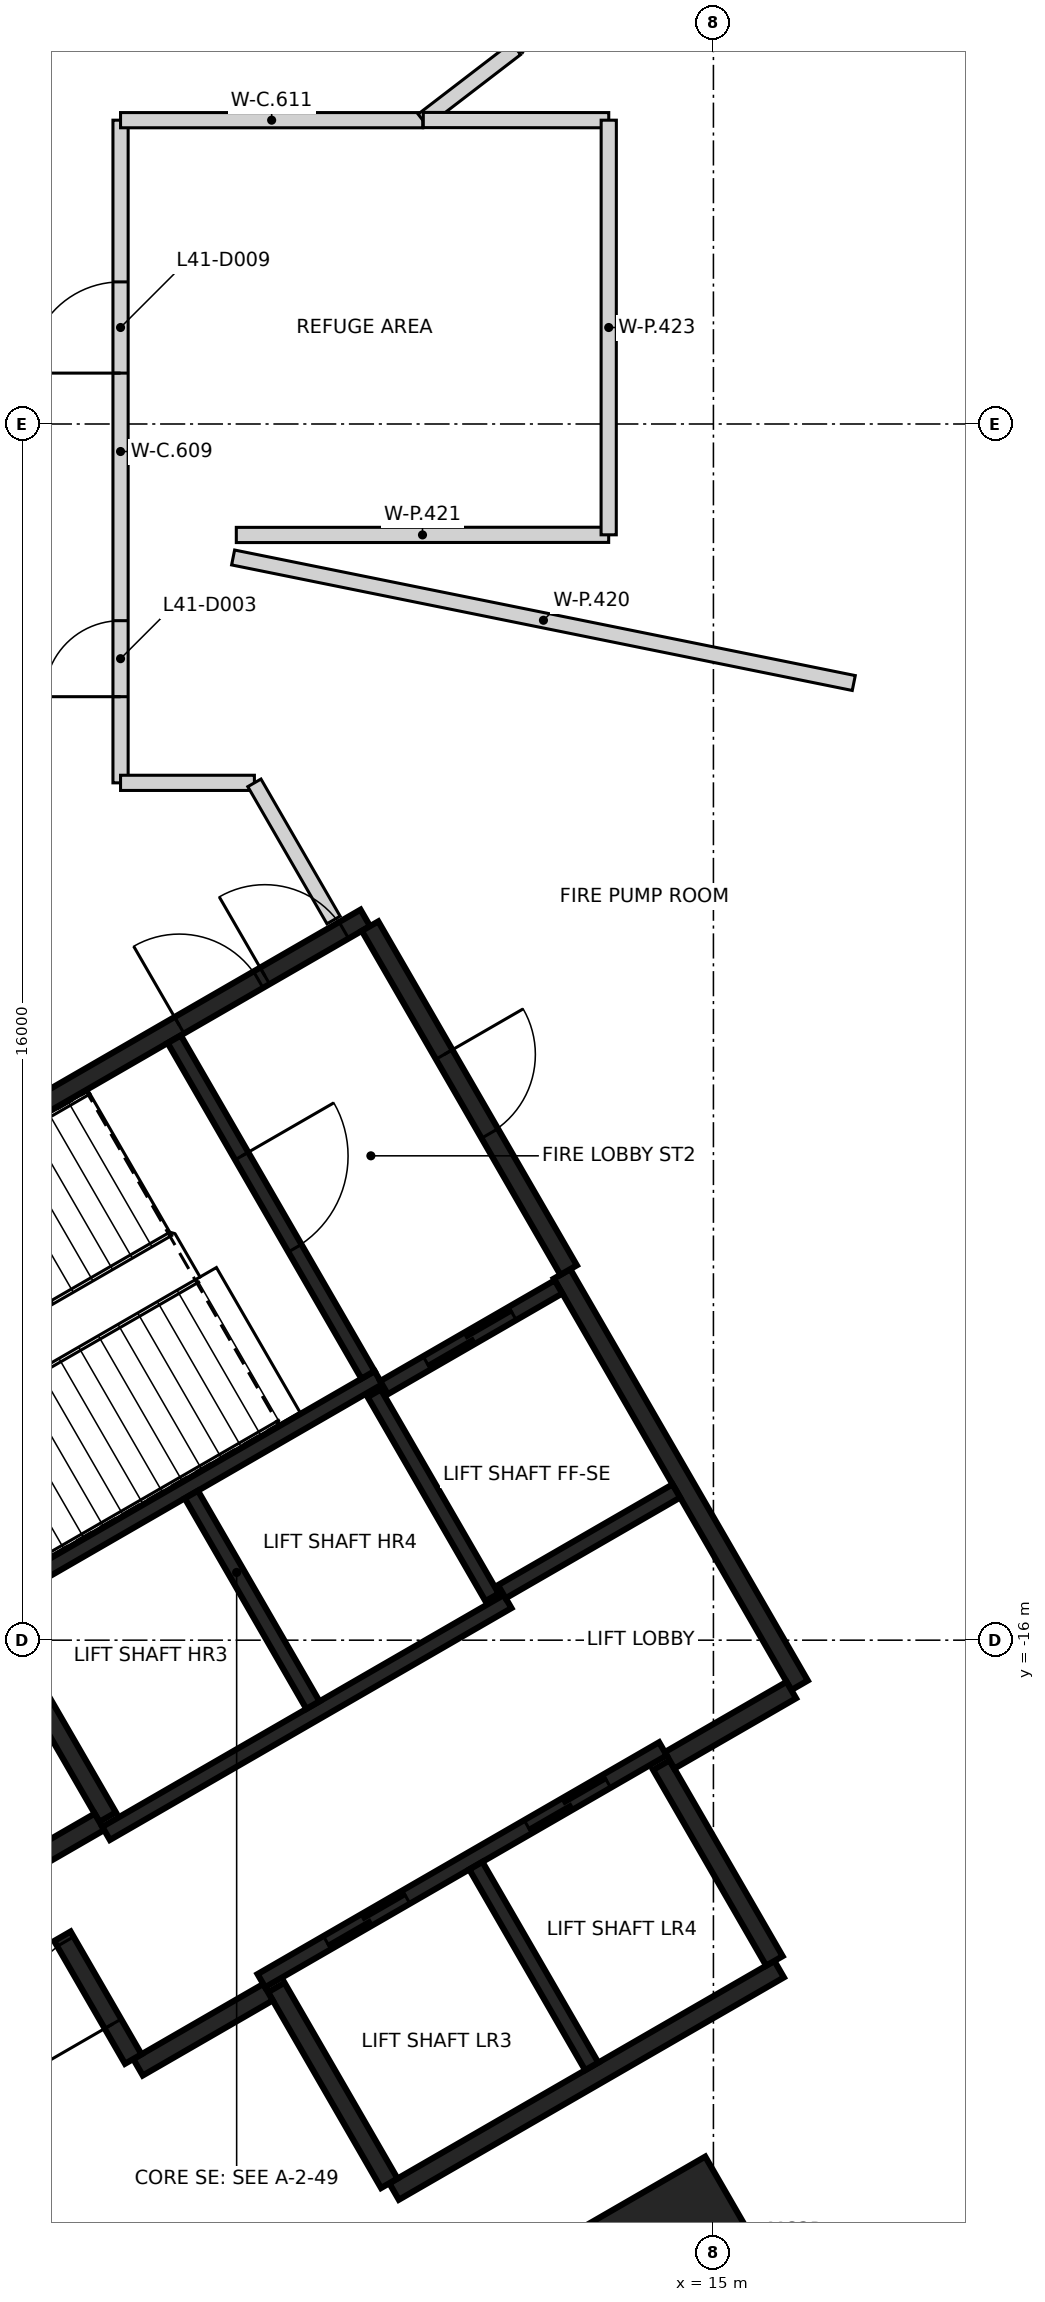
"""IFC4 building model, lengths in metres.
Left out: names, types, materials, properties, quantities, classifications, styles, units other than length and angle.
Written with IfcOpenShell. Run it as: python <this file> out.ifc"""

import sys

from ifc_helpers import new_model, si_unit, direction, frame, frame_2d, origin, origin_2d, place, context, subcontext, project, spatial, rectangle, extrude, element, fill, save


model = new_model("IFC4")
c1 = context("Model", 3, precision=1e-05, world=origin(), true_north=direction((0.0, 1.0)))
c2 = subcontext(c1, "Body", "Model", "MODEL_VIEW")
j1 = project(units=[si_unit("LENGTHUNIT", "METRE"), si_unit("PLANEANGLEUNIT", "RADIAN")], contexts=[c1])
p1 = place(None, origin())
s1 = spatial("IfcSite", under=j1, at=p1, CompositionType="ELEMENT")
p2 = place(p1, origin())
s2 = spatial("IfcBuilding", under=s1, at=p2, CompositionType="ELEMENT")
p3 = place(p2, frame((0.0, 0.0, 164.8)))
s3 = spatial("IfcBuildingStorey", under=s2, at=p3, CompositionType="ELEMENT", Elevation=164.8)
p4 = place(p3, frame((14.493, -25.103, -0.4), z_axis=(0.0, 0.0, 1.0), x_axis=(-0.5, 0.866025403784, 0.0)))
e1 = element("IfcColumn", 1, at=p4, inside=s3, PredefinedType="COLUMN", context=c2, shape_type="SweptSolid", body=[
    extrude(rectangle(XDim=3.6, YDim=3.0, at=origin_2d()), origin(), (0.0, 0.0, 1.0), 4.85),
])
p5 = place(p3, frame((0.417, -12.273, 0.0), z_axis=(0.0, 0.0, 1.0), x_axis=(0.866021906294, 0.500006057782, 0.0)))
e2 = element("IfcWall", 2, at=p5, inside=s3, PredefinedType="SHEAR", context=c2, shape_type="SweptSolid", body=[
    extrude(rectangle(XDim=11.55, YDim=0.25, at=frame_2d((5.775, 0.0))), origin(), (0.0, 0.0, 1.0), 4.45),
])
p6 = place(p5, frame((10.025, 0.0, 0.0)))
e3 = element("IfcOpeningElement", 3, at=p6, cuts=e2, PredefinedType="OPENING", context=c2, shape_type="SweptSolid", body=[
    extrude(rectangle(XDim=1.2, YDim=2.1, at=frame_2d((0.6, 1.05))), frame((0.0, 0.135, 0.0), z_axis=(0.0, -1.0, 0.0), x_axis=(1.0, 0.0, 0.0)), (0.0, 0.0, 1.0), 0.27),
])
p7 = place(p5, frame((8.725, 0.0, 0.0)))
e4 = element("IfcOpeningElement", 4, at=p7, cuts=e2, PredefinedType="OPENING", context=c2, shape_type="SweptSolid", body=[
    extrude(rectangle(XDim=1.2, YDim=2.1, at=frame_2d((0.6, 1.05))), frame((0.0, 0.135, 0.0), z_axis=(0.0, -1.0, 0.0), x_axis=(1.0, 0.0, 0.0)), (0.0, 0.0, 1.0), 0.27),
])
p8 = place(p3, frame((13.008, -11.181, 0.0), z_axis=(0.0, 0.0, 1.0), x_axis=(0.500004234368, -0.866022959057, 0.0)))
e5 = element("IfcWall", 5, at=p8, inside=s3, PredefinedType="SHEAR", context=c2, shape_type="SweptSolid", body=[
    extrude(rectangle(XDim=6.25, YDim=0.25, at=frame_2d((3.125, 0.0))), origin(), (0.0, 0.0, 1.0), 4.45),
])
p9 = place(p3, frame((15.865, -20.328, 0.0), z_axis=(0.0, 0.0, 1.0), x_axis=(-0.86602852612, -0.499994591916, 0.0)))
e6 = element("IfcWall", 6, at=p9, inside=s3, PredefinedType="SHEAR", context=c2, shape_type="SweptSolid", body=[
    extrude(rectangle(XDim=5.85, YDim=0.25, at=frame_2d((2.925, 0.0))), origin(), (0.0, 0.0, 1.0), 4.45),
])
p10 = place(p3, frame((10.483, -6.606, 0.0), z_axis=(0.0, 0.0, 1.0), x_axis=(0.49999885962, -0.866026062182, 0.0)))
e7 = element("IfcWall", 7, at=p10, inside=s3, PredefinedType="SHEAR", context=c2, shape_type="SweptSolid", body=[
    extrude(rectangle(XDim=5.225, YDim=0.25, at=frame_2d((2.612, 0.0))), origin(), (0.0, 0.0, 1.0), 4.45),
])
p11 = place(p10, frame((1.95, 0.0, 0.0)))
e8 = element("IfcOpeningElement", 8, at=p11, cuts=e7, PredefinedType="OPENING", context=c2, shape_type="SweptSolid", body=[
    extrude(rectangle(XDim=1.2, YDim=2.1, at=frame_2d((0.6, 1.05))), frame((0.0, 0.135, 0.0), z_axis=(0.0, -1.0, 0.0), x_axis=(1.0, 0.0, 0.0)), (0.0, 0.0, 1.0), 0.27),
])
p12 = place(p3, frame((7.031, -18.327, 0.0), z_axis=(0.0, 0.0, 1.0), x_axis=(-0.499971222258, 0.866042017984, 0.0)))
e9 = element("IfcWall", 9, at=p12, inside=s3, PredefinedType="SHEAR", context=c2, shape_type="SweptSolid", body=[
    extrude(rectangle(XDim=3.2, YDim=0.25, at=frame_2d((1.6, 0.0))), origin(), (0.0, 0.0, 1.0), 4.45),
])
for number, where, z_axis, x_axis in (
    (10, (14.315, -17.644, 0.0), (0.0, 0.0, 1.0), (0.5, -0.866, 0.0)),
    (11, (10.736, -23.145, 0.0), (0.0, 0.0, 1.0), (-0.5, 0.866, 0.0)),
):
    element("IfcWall", number, at=place(p3, frame(where, z_axis=z_axis, x_axis=x_axis)), inside=s3, PredefinedType="SHEAR", context=c2, shape_type="SweptSolid", body=[
        extrude(rectangle(XDim=2.974, YDim=0.25, at=frame_2d((1.487, 0.0))), origin(), (0.0, 0.0, 1.0), 4.45),
    ])
p13 = place(p3, frame((9.14, -20.631, 0.0), z_axis=(0.0, 0.0, 1.0), x_axis=(-0.866043531843, -0.499968599967, 0.0)))
e12 = element("IfcWall", 12, at=p13, inside=s3, PredefinedType="SHEAR", context=c2, shape_type="SweptSolid", body=[
    extrude(rectangle(XDim=1.975, YDim=0.25, at=frame_2d((0.987, 0.0))), origin(), (0.0, 0.0, 1.0), 4.45),
])
p14 = place(p3, frame((16.025, -16.656, 0.0), z_axis=(0.0, 0.0, 1.0), x_axis=(-0.866016279763, -0.500015802937, 0.0)))
e13 = element("IfcWall", 13, at=p14, inside=s3, PredefinedType="SHEAR", context=c2, shape_type="SweptSolid", body=[
    extrude(rectangle(XDim=1.849, YDim=0.25, at=frame_2d((0.925, 0.0))), origin(), (0.0, 0.0, 1.0), 4.45),
])
p15 = place(p3, frame((7.367, -21.51, 0.0), z_axis=(0.0, 0.0, 1.0), x_axis=(-0.499983108224, 0.866035156036, 0.0)))
e14 = element("IfcWall", 14, at=p15, inside=s3, PredefinedType="SHEAR", context=c2, shape_type="SweptSolid", body=[
    extrude(rectangle(XDim=1.865, YDim=0.25, at=frame_2d((0.932, 0.0))), origin(), (0.0, 0.0, 1.0), 4.45),
])
p16 = place(p15, frame((0.535, 0.0, 0.0)))
e15 = element("IfcOpeningElement", 15, at=p16, cuts=e14, PredefinedType="OPENING", context=c2, shape_type="SweptSolid", body=[
    extrude(rectangle(XDim=1.25, YDim=2.1, at=frame_2d((0.625, 1.05))), frame((0.0, 0.135, 0.0), z_axis=(0.0, -1.0, 0.0), x_axis=(1.0, 0.0, 0.0)), (0.0, 0.0, 1.0), 0.27),
])
p17 = place(p3, frame((6.065, -18.885, 0.0), z_axis=(0.0, 0.0, 1.0), x_axis=(0.866017078145, 0.500014420154, 0.0)))
e16 = element("IfcWall", 16, at=p17, inside=s3, PredefinedType="SHEAR", context=c2, shape_type="SweptSolid", body=[
    extrude(rectangle(XDim=0.989, YDim=0.25, at=frame_2d((0.495, 0.0))), origin(), (0.0, 0.0, 1.0), 4.45),
])
p18 = place(p3, frame((9.052, -20.48, 0.0), z_axis=(0.0, 0.0, 1.0), x_axis=(0.866030299012, 0.499991521122, 0.0)))
e17 = element("IfcWall", 17, at=p18, inside=s3, PredefinedType="SHEAR", context=c2, shape_type="SweptSolid", body=[
    extrude(rectangle(XDim=6.1, YDim=0.2, at=frame_2d((3.05, 0.0))), origin(), (0.0, 0.0, 1.0), 4.45),
])
p19 = place(p18, frame((1.0, 0.0, 0.0)))
e18 = element("IfcOpeningElement", 18, at=p19, cuts=e17, PredefinedType="OPENING", context=c2, shape_type="SweptSolid", body=[
    extrude(rectangle(XDim=1.2, YDim=2.1, at=frame_2d((0.6, 1.05))), frame((0.0, 0.11, 0.0), z_axis=(0.0, -1.0, 0.0), x_axis=(1.0, 0.0, 0.0)), (0.0, 0.0, 1.0), 0.22),
])
p20 = place(p18, frame((4.05, 0.0, 0.0)))
e19 = element("IfcOpeningElement", 19, at=p20, cuts=e17, PredefinedType="OPENING", context=c2, shape_type="SweptSolid", body=[
    extrude(rectangle(XDim=1.2, YDim=2.1, at=frame_2d((0.6, 1.05))), frame((0.0, 0.11, 0.0), z_axis=(0.0, -1.0, 0.0), x_axis=(1.0, 0.0, 0.0)), (0.0, 0.0, 1.0), 0.22),
])
p21 = place(p3, frame((5.526, -15.472, 0.0), z_axis=(0.0, 0.0, 1.0), x_axis=(0.866041752167, 0.499971682701, 0.0)))
e20 = element("IfcWall", 20, at=p21, inside=s3, PredefinedType="SHEAR", context=c2, shape_type="SweptSolid", body=[
    extrude(rectangle(XDim=5.851, YDim=0.2, at=frame_2d((2.925, 0.0))), origin(), (0.0, 0.0, 1.0), 4.45),
])
p22 = place(p3, frame((12.293, -15.491, 0.0), z_axis=(0.0, 0.0, 1.0), x_axis=(-0.866030299012, -0.499991521122, 0.0)))
e21 = element("IfcWall", 21, at=p22, inside=s3, PredefinedType="SHEAR", context=c2, shape_type="SweptSolid", body=[
    extrude(rectangle(XDim=6.1, YDim=0.2, at=frame_2d((3.05, 0.0))), origin(), (0.0, 0.0, 1.0), 4.45),
])
p23 = place(p3, frame((7.906, -8.094, 0.0), z_axis=(0.0, 0.0, 1.0), x_axis=(0.500027839223, -0.866009330205, 0.0)))
e22 = element("IfcWall", 22, at=p23, inside=s3, PredefinedType="SHEAR", context=c2, shape_type="SweptSolid", body=[
    extrude(rectangle(XDim=5.098, YDim=0.2, at=frame_2d((2.549, 0.0))), origin(), (0.0, 0.0, 1.0), 4.45),
])
p24 = place(p23, frame((1.774, 0.0, 0.0)))
e23 = element("IfcOpeningElement", 23, at=p24, cuts=e22, PredefinedType="OPENING", context=c2, shape_type="SweptSolid", body=[
    extrude(rectangle(XDim=1.4, YDim=2.1, at=frame_2d((0.7, 1.05))), frame((0.0, 0.11, 0.0), z_axis=(0.0, -1.0, 0.0), x_axis=(1.0, 0.0, 0.0)), (0.0, 0.0, 1.0), 0.22),
])
p25 = place(p3, frame((8.132, -14.084, 0.0), z_axis=(0.0, 0.0, 1.0), x_axis=(0.499997778408, -0.866026686418, 0.0)))
e24 = element("IfcWall", 24, at=p25, inside=s3, PredefinedType="SHEAR", context=c2, shape_type="SweptSolid", body=[
    extrude(rectangle(XDim=3.198, YDim=0.2, at=frame_2d((1.599, 0.0))), origin(), (0.0, 0.0, 1.0), 4.45),
])
p26 = place(p3, frame((11.875, -18.967, 0.0), z_axis=(0.0, 0.0, 1.0), x_axis=(0.49998131003, -0.866036194175, 0.0)))
e25 = element("IfcWall", 25, at=p26, inside=s3, PredefinedType="SHEAR", context=c2, shape_type="SweptSolid", body=[
    extrude(rectangle(XDim=3.048, YDim=0.2, at=frame_2d((1.524, 0.0))), origin(), (0.0, 0.0, 1.0), 4.45),
])
p27 = place(p3, frame((12.088, -15.437, 0.0), z_axis=(0.0, 0.0, 1.0), x_axis=(-0.500026960575, 0.86600983753, 0.0)))
e26 = element("IfcWall", 26, at=p27, inside=s3, PredefinedType="SHEAR", context=c2, shape_type="SweptSolid", body=[
    extrude(rectangle(XDim=3.1, YDim=0.2, at=frame_2d((1.55, 0.0))), origin(), (0.0, 0.0, 1.0), 4.45),
])
p28 = place(p3, frame((10.666, -12.678, 0.0), z_axis=(0.0, 0.0, 1.0), x_axis=(0.866018407898, 0.500012117035, 0.0)))
e27 = element("IfcWall", 27, at=p28, inside=s3, PredefinedType="SHEAR", context=c2, shape_type="SweptSolid", body=[
    extrude(rectangle(XDim=2.651, YDim=0.2, at=frame_2d((1.325, 0.0))), origin(), (0.0, 0.0, 1.0), 4.45),
])
p29 = place(p28, frame((0.652, 0.0, 0.0)))
e28 = element("IfcOpeningElement", 28, at=p29, cuts=e27, PredefinedType="OPENING", context=c2, shape_type="SweptSolid", body=[
    extrude(rectangle(XDim=1.3, YDim=2.1, at=frame_2d((0.65, 1.05))), frame((0.0, 0.11, 0.0), z_axis=(0.0, -1.0, 0.0), x_axis=(1.0, 0.0, 0.0)), (0.0, 0.0, 1.0), 0.22),
])
p30 = place(p3, frame((14.512, -14.037, 0.0), z_axis=(0.0, 0.0, 1.0), x_axis=(-0.866018407898, -0.500012117035, 0.0)))
e29 = element("IfcWall", 29, at=p30, inside=s3, PredefinedType="SHEAR", context=c2, shape_type="SweptSolid", body=[
    extrude(rectangle(XDim=2.651, YDim=0.2, at=frame_2d((1.325, 0.0))), origin(), (0.0, 0.0, 1.0), 4.45),
])
p31 = place(p3, frame((7.2, -4.721, 0.0), z_axis=(0.0, 0.0, 1.0), x_axis=(0.0, 1.0, 0.0)))
e30 = element("IfcWall", 30, at=p31, inside=s3, PredefinedType="PARTITIONING", context=c2, shape_type="SweptSolid", body=[
    extrude(rectangle(XDim=8.718, YDim=0.2, at=frame_2d((4.359, 0.0))), origin(), (0.0, 0.0, 1.0), 4.45),
])
p32 = place(p31, frame((1.134, 0.0, 0.0)))
e31 = element("IfcOpeningElement", 31, at=p32, cuts=e30, PredefinedType="OPENING", context=c2, shape_type="SweptSolid", body=[
    extrude(rectangle(XDim=1.0, YDim=2.1, at=frame_2d((0.5, 1.05))), frame((0.0, 0.11, 0.0), z_axis=(0.0, -1.0, 0.0), x_axis=(1.0, 0.0, 0.0)), (0.0, 0.0, 1.0), 0.22),
])
p33 = place(p31, frame((5.39, 0.0, 0.0)))
e32 = element("IfcOpeningElement", 32, at=p33, cuts=e30, PredefinedType="OPENING", context=c2, shape_type="SweptSolid", body=[
    extrude(rectangle(XDim=1.2, YDim=2.1, at=frame_2d((0.6, 1.05))), frame((0.0, 0.11, 0.0), z_axis=(0.0, -1.0, 0.0), x_axis=(1.0, 0.0, 0.0)), (0.0, 0.0, 1.0), 0.22),
])
p34 = place(p3, frame((7.2, -4.721, 0.0), z_axis=(0.0, 0.0, 1.0), x_axis=(1.0, 0.0, 0.0)))
e33 = element("IfcWall", 33, at=p34, inside=s3, PredefinedType="PARTITIONING", context=c2, shape_type="SweptSolid", body=[
    extrude(rectangle(XDim=1.761, YDim=0.2, at=frame_2d((0.88, 0.0))), origin(), (0.0, 0.0, 1.0), 4.45),
])
p35 = place(p3, frame((7.2, 3.997, 0.0), z_axis=(0.0, 0.0, 1.0), x_axis=(1.0, 0.0, 0.0)))
e34 = element("IfcWall", 34, at=p35, inside=s3, PredefinedType="PARTITIONING", context=c2, shape_type="SweptSolid", body=[
    extrude(rectangle(XDim=3.976, YDim=0.2, at=frame_2d((1.988, 0.0))), origin(), (0.0, 0.0, 1.0), 4.45),
])
p36 = place(p3, frame((8.961, -4.721, 0.0), z_axis=(0.0, 0.0, 1.0), x_axis=(0.499806992981, -0.866136807766, 0.0)))
e35 = element("IfcWall", 35, at=p36, inside=s3, PredefinedType="PARTITIONING", context=c2, shape_type="SweptSolid", body=[
    extrude(rectangle(XDim=2.083, YDim=0.2, at=frame_2d((1.042, 0.0))), origin(), (0.0, 0.0, 1.0), 4.45),
])
p37 = place(p3, frame((11.176, 3.997, 0.0), z_axis=(0.0, 0.0, 1.0), x_axis=(0.793245502763, 0.608901939845, 0.0)))
e36 = element("IfcWall", 36, at=p37, inside=s3, PredefinedType="PARTITIONING", context=c2, shape_type="SweptSolid", body=[
    extrude(rectangle(XDim=1.547, YDim=0.2, at=frame_2d((0.773, 0.0))), origin(), (0.0, 0.0, 1.0), 4.45),
])
p38 = place(p3, frame((12.403, 4.939, 0.0), z_axis=(0.0, 0.0, 1.0), x_axis=(0.492759848643, 0.870165347256, 0.0)))
e37 = element("IfcWall", 37, at=p38, inside=s3, PredefinedType="PARTITIONING", context=c2, shape_type="SweptSolid", body=[
    extrude(rectangle(XDim=4.144, YDim=0.2, at=frame_2d((2.072, 0.0))), origin(), (0.0, 0.0, 1.0), 4.45),
])
p39 = place(p38, frame((1.57, 0.0, 0.0)))
e38 = element("IfcOpeningElement", 38, at=p39, cuts=e37, PredefinedType="OPENING", context=c2, shape_type="SweptSolid", body=[
    extrude(rectangle(XDim=1.0, YDim=2.1, at=frame_2d((0.5, 1.05))), frame((0.0, 0.11, 0.0), z_axis=(0.0, -1.0, 0.0), x_axis=(1.0, 0.0, 0.0)), (0.0, 0.0, 1.0), 0.22),
])
p40 = place(p3, frame((8.681, -1.756, 0.0), z_axis=(0.0, 0.0, 1.0), x_axis=(0.980151165676, -0.198251588704, 0.0)))
e39 = element("IfcWall", 39, at=p40, inside=s3, PredefinedType="PARTITIONING", context=c2, shape_type="SweptSolid", body=[
    extrude(rectangle(XDim=8.331, YDim=0.2, at=frame_2d((4.166, 0.0))), origin(), (0.0, 0.0, 1.0), 4.45),
])
p41 = place(p3, frame((8.723, -1.46, 0.0), z_axis=(0.0, 0.0, 1.0), x_axis=(0.999999920533, 0.000398664442, 0.0)))
e40 = element("IfcWall", 40, at=p41, inside=s3, PredefinedType="PARTITIONING", context=c2, shape_type="SweptSolid", body=[
    extrude(rectangle(XDim=4.899, YDim=0.2, at=frame_2d((2.45, 0.0))), origin(), (0.0, 0.0, 1.0), 4.45),
])
p42 = place(p3, frame((11.183, 3.999, 0.0), z_axis=(0.0, 0.0, 1.0), x_axis=(0.999999679616, -0.000800480032, 0.0)))
e41 = element("IfcWall", 41, at=p42, inside=s3, PredefinedType="PARTITIONING", context=c2, shape_type="SweptSolid", body=[
    extrude(rectangle(XDim=2.44, YDim=0.2, at=frame_2d((1.22, 0.0))), origin(), (0.0, 0.0, 1.0), 4.45),
])
p43 = place(p3, frame((13.622, -1.458, 0.0), z_axis=(0.0, 0.0, 1.0), x_axis=(0.000179018973, 0.999999983976, 0.0)))
e42 = element("IfcWall", 42, at=p43, inside=s3, PredefinedType="PARTITIONING", context=c2, shape_type="SweptSolid", body=[
    extrude(rectangle(XDim=5.455, YDim=0.2, at=frame_2d((2.728, 0.0))), origin(), (0.0, 0.0, 1.0), 4.45),
])
p44 = place(p29, origin())
e43 = element("IfcDoor", 43, at=p44, inside=s3, OperationType="SLIDING_TO_LEFT", PredefinedType="DOOR", context=c2, shape_type="SweptSolid", body=[
    extrude(rectangle(XDim=1.3, YDim=2.1, at=frame_2d((0.65, 1.05))), frame((0.0, 0.025, 0.0), z_axis=(0.0, -1.0, 0.0), x_axis=(1.0, 0.0, 0.0)), (0.0, 0.0, 1.0), 0.05),
])
fill(e28, e43)
p45 = place(p19, origin())
e44 = element("IfcDoor", 44, at=p45, inside=s3, OperationType="DOUBLE_DOOR_SLIDING", PredefinedType="DOOR", context=c2, shape_type="SweptSolid", body=[
    extrude(rectangle(XDim=1.2, YDim=2.1, at=frame_2d((0.6, 1.05))), frame((0.0, 0.025, 0.0), z_axis=(0.0, -1.0, 0.0), x_axis=(1.0, 0.0, 0.0)), (0.0, 0.0, 1.0), 0.05),
])
fill(e18, e44)
p46 = place(p20, origin())
e45 = element("IfcDoor", 45, at=p46, inside=s3, OperationType="DOUBLE_DOOR_SLIDING", PredefinedType="DOOR", context=c2, shape_type="SweptSolid", body=[
    extrude(rectangle(XDim=1.2, YDim=2.1, at=frame_2d((0.6, 1.05))), frame((0.0, 0.025, 0.0), z_axis=(0.0, -1.0, 0.0), x_axis=(1.0, 0.0, 0.0)), (0.0, 0.0, 1.0), 0.05),
])
fill(e19, e45)
p47 = place(p16, origin())
e46 = element("IfcDoor", 46, at=p47, inside=s3, OperationType="SINGLE_SWING_LEFT", PredefinedType="DOOR", context=c2, shape_type="SweptSolid", body=[
    extrude(rectangle(XDim=1.25, YDim=2.1, at=frame_2d((0.625, 1.05))), frame((0.0, 0.025, 0.0), z_axis=(0.0, -1.0, 0.0), x_axis=(1.0, 0.0, 0.0)), (0.0, 0.0, 1.0), 0.05),
])
fill(e15, e46)
p48 = place(p6, origin())
e47 = element("IfcDoor", 47, at=p48, inside=s3, OperationType="SINGLE_SWING_LEFT", PredefinedType="DOOR", context=c2, shape_type="SweptSolid", body=[
    extrude(rectangle(XDim=1.2, YDim=2.1, at=frame_2d((0.6, 1.05))), frame((0.0, 0.025, 0.0), z_axis=(0.0, -1.0, 0.0), x_axis=(1.0, 0.0, 0.0)), (0.0, 0.0, 1.0), 0.05),
])
fill(e3, e47)
p49 = place(p7, origin())
e48 = element("IfcDoor", 48, at=p49, inside=s3, OperationType="SINGLE_SWING_RIGHT", PredefinedType="DOOR", context=c2, shape_type="SweptSolid", body=[
    extrude(rectangle(XDim=1.2, YDim=2.1, at=frame_2d((0.6, 1.05))), frame((0.0, 0.025, 0.0), z_axis=(0.0, -1.0, 0.0), x_axis=(1.0, 0.0, 0.0)), (0.0, 0.0, 1.0), 0.05),
])
fill(e4, e48)
p50 = place(p24, origin())
e49 = element("IfcDoor", 49, at=p50, inside=s3, OperationType="SINGLE_SWING_LEFT", PredefinedType="DOOR", context=c2, shape_type="SweptSolid", body=[
    extrude(rectangle(XDim=1.4, YDim=2.1, at=frame_2d((0.7, 1.05))), frame((0.0, 0.025, 0.0), z_axis=(0.0, -1.0, 0.0), x_axis=(1.0, 0.0, 0.0)), (0.0, 0.0, 1.0), 0.05),
])
fill(e23, e49)
p51 = place(p11, origin())
e50 = element("IfcDoor", 50, at=p51, inside=s3, OperationType="SINGLE_SWING_RIGHT", PredefinedType="DOOR", context=c2, shape_type="SweptSolid", body=[
    extrude(rectangle(XDim=1.2, YDim=2.1, at=frame_2d((0.6, 1.05))), frame((0.0, 0.025, 0.0), z_axis=(0.0, -1.0, 0.0), x_axis=(1.0, 0.0, 0.0)), (0.0, 0.0, 1.0), 0.05),
])
fill(e8, e50)
p52 = place(p32, frame((1.0, 0.0, 0.0), z_axis=(0.0, 0.0, 1.0), x_axis=(-1.0, 0.0, 0.0)))
e51 = element("IfcDoor", 51, at=p52, inside=s3, OperationType="SINGLE_SWING_LEFT", PredefinedType="DOOR", context=c2, shape_type="SweptSolid", body=[
    extrude(rectangle(XDim=1.0, YDim=2.1, at=frame_2d((0.5, 1.05))), frame((0.0, 0.025, 0.0), z_axis=(0.0, -1.0, 0.0), x_axis=(1.0, 0.0, 0.0)), (0.0, 0.0, 1.0), 0.05),
])
fill(e31, e51)
p53 = place(p33, frame((1.2, 0.0, 0.0), z_axis=(0.0, 0.0, 1.0), x_axis=(-1.0, 0.0, 0.0)))
e52 = element("IfcDoor", 52, at=p53, inside=s3, OperationType="SINGLE_SWING_LEFT", PredefinedType="DOOR", context=c2, shape_type="SweptSolid", body=[
    extrude(rectangle(XDim=1.2, YDim=2.1, at=frame_2d((0.6, 1.05))), frame((0.0, 0.025, 0.0), z_axis=(0.0, -1.0, 0.0), x_axis=(1.0, 0.0, 0.0)), (0.0, 0.0, 1.0), 0.05),
])
fill(e32, e52)
save(model, sys.argv[1])
